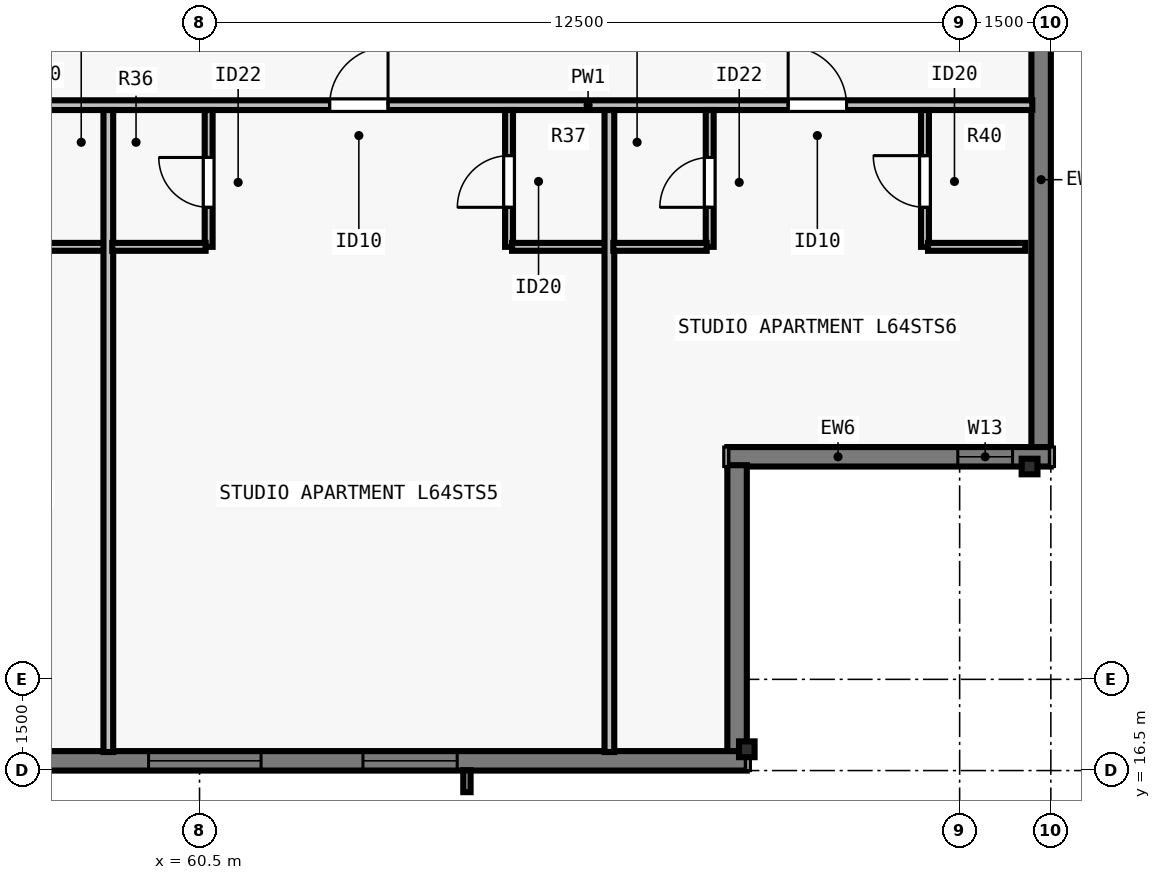
"""IFC4 building model, lengths in metres.
Left out: names, types, materials, properties, quantities, classifications, styles, units other than length and angle.
Written with IfcOpenShell. Run it as: python <this file> out.ifc"""

import sys

from ifc_helpers import new_model, si_unit, direction, frame, frame_2d, origin, origin_2d, place, context, subcontext, project, spatial, rectangle, i_section, extrude, element, fill, save


model = new_model("IFC4")
c1 = context("Model", 3, precision=1e-05, world=origin(), true_north=direction((0.0, 1.0)))
c2 = subcontext(c1, "Body", "Model", "MODEL_VIEW")
j1 = project(units=[si_unit("LENGTHUNIT", "METRE"), si_unit("PLANEANGLEUNIT", "RADIAN")], contexts=[c1])
p1 = place(None, origin())
s1 = spatial("IfcSite", under=j1, at=p1, CompositionType="ELEMENT")
p2 = place(p1, origin())
s2 = spatial("IfcBuilding", under=s1, at=p2, CompositionType="ELEMENT")
p3 = place(p2, frame((0.0, 0.0, 234.0)))
s3 = spatial("IfcBuildingStorey", under=s2, at=p3, CompositionType="ELEMENT", Elevation=234.0)
for number, where, z_axis, x_axis in (
    (1, (69.5, 16.85, 0.0), (0.0, 0.0, 1.0), (1.0, 0.0, 0.0)),
    (2, (74.15, 21.5, 0.0), (0.0, 0.0, 1.0), (0.0, 1.0, 0.0)),
):
    element("IfcColumn", number, at=place(p3, frame(where, z_axis=z_axis, x_axis=x_axis)), inside=s3, PredefinedType="COLUMN", context=c2, shape_type="SweptSolid", body=[
        extrude(i_section(OverallWidth=0.256, OverallDepth=0.26, WebThickness=0.01, FlangeThickness=0.017, FilletRadius=0.013, at=origin_2d()), origin(), (0.0, 0.0, 1.0), 3.5),
    ])
p4 = place(p3, frame((74.34, 56.5, 0.0), z_axis=(0.0, 0.0, 1.0), x_axis=(0.0, -1.0, 0.0)))
e3 = element("IfcWall", 3, at=p4, inside=s3, PredefinedType="SOLIDWALL", context=c2, shape_type="SweptSolid", body=[
    extrude(rectangle(XDim=34.702, YDim=0.32, at=frame_2d((17.351, 0.0))), origin(), (0.0, 0.0, 1.0), 3.29),
])
p5 = place(p4, frame((3.913, 0.0, 0.8)))
e4 = element("IfcOpeningElement", 4, at=p5, cuts=e3, PredefinedType="OPENING", context=c2, shape_type="SweptSolid", body=[
    extrude(rectangle(XDim=1.55, YDim=1.678, at=frame_2d((0.775, 0.839))), frame((0.0, 0.17, 0.0), z_axis=(0.0, -1.0, 0.0), x_axis=(1.0, 0.0, 0.0)), (0.0, 0.0, 1.0), 0.34),
])
p6 = place(p4, frame((6.738, 0.0, 0.8)))
e5 = element("IfcOpeningElement", 5, at=p6, cuts=e3, PredefinedType="OPENING", context=c2, shape_type="SweptSolid", body=[
    extrude(rectangle(XDim=1.85, YDim=1.678, at=frame_2d((0.925, 0.839))), frame((0.0, 0.17, 0.0), z_axis=(0.0, -1.0, 0.0), x_axis=(1.0, 0.0, 0.0)), (0.0, 0.0, 1.0), 0.34),
])
p7 = place(p4, frame((10.263, 0.0, 0.8)))
e6 = element("IfcOpeningElement", 6, at=p7, cuts=e3, PredefinedType="OPENING", context=c2, shape_type="SweptSolid", body=[
    extrude(rectangle(XDim=1.55, YDim=1.678, at=frame_2d((0.775, 0.839))), frame((0.0, 0.17, 0.0), z_axis=(0.0, -1.0, 0.0), x_axis=(1.0, 0.0, 0.0)), (0.0, 0.0, 1.0), 0.34),
])
p8 = place(p4, frame((14.738, 0.0, 0.8)))
e7 = element("IfcOpeningElement", 7, at=p8, cuts=e3, PredefinedType="OPENING", context=c2, shape_type="SweptSolid", body=[
    extrude(rectangle(XDim=1.85, YDim=1.678, at=frame_2d((0.925, 0.839))), frame((0.0, 0.17, 0.0), z_axis=(0.0, -1.0, 0.0), x_axis=(1.0, 0.0, 0.0)), (0.0, 0.0, 1.0), 0.34),
])
p9 = place(p4, frame((18.264, 0.0, 0.8)))
e8 = element("IfcOpeningElement", 8, at=p9, cuts=e3, PredefinedType="OPENING", context=c2, shape_type="SweptSolid", body=[
    extrude(rectangle(XDim=1.55, YDim=1.678, at=frame_2d((0.775, 0.839))), frame((0.0, 0.17, 0.0), z_axis=(0.0, -1.0, 0.0), x_axis=(1.0, 0.0, 0.0)), (0.0, 0.0, 1.0), 0.34),
])
p10 = place(p4, frame((24.164, 0.0, 0.8)))
e9 = element("IfcOpeningElement", 9, at=p10, cuts=e3, PredefinedType="OPENING", context=c2, shape_type="SweptSolid", body=[
    extrude(rectangle(XDim=1.55, YDim=1.678, at=frame_2d((0.775, 0.839))), frame((0.0, 0.17, 0.0), z_axis=(0.0, -1.0, 0.0), x_axis=(1.0, 0.0, 0.0)), (0.0, 0.0, 1.0), 0.34),
])
p11 = place(p3, frame((74.5, 21.66, 0.0), z_axis=(0.0, 0.0, 1.0), x_axis=(-1.0, 0.0, 0.0)))
e10 = element("IfcWall", 10, at=p11, inside=s3, PredefinedType="SOLIDWALL", context=c2, shape_type="SweptSolid", body=[
    extrude(rectangle(XDim=5.32, YDim=0.32, at=frame_2d((2.66, 0.0))), origin(), (0.0, 0.0, 1.0), 3.29),
])
p12 = place(p11, frame((0.63, 0.0, 0.8)))
e11 = element("IfcOpeningElement", 11, at=p12, cuts=e10, PredefinedType="OPENING", context=c2, shape_type="SweptSolid", body=[
    extrude(rectangle(XDim=0.9, YDim=1.678, at=frame_2d((0.45, 0.839))), frame((0.0, 0.17, 0.0), z_axis=(0.0, -1.0, 0.0), x_axis=(1.0, 0.0, 0.0)), (0.0, 0.0, 1.0), 0.34),
])
p13 = place(p3, frame((69.34, 21.522, 0.0), z_axis=(0.0, 0.0, 1.0), x_axis=(0.0, -1.0, 0.0)))
e12 = element("IfcWall", 12, at=p13, inside=s3, PredefinedType="SOLIDWALL", context=c2, shape_type="SweptSolid", body=[
    extrude(rectangle(XDim=4.724, YDim=0.32, at=frame_2d((2.362, 0.0))), origin(), (0.0, 0.0, 1.0), 3.29),
])
p14 = place(p3, frame((69.5, 16.66, 0.0), z_axis=(0.0, 0.0, 1.0), x_axis=(-1.0, 0.0, 0.0)))
e13 = element("IfcWall", 13, at=p14, inside=s3, PredefinedType="SOLIDWALL", context=c2, shape_type="SweptSolid", body=[
    extrude(rectangle(XDim=34.702, YDim=0.32, at=frame_2d((17.351, 0.0))), origin(), (0.0, 0.0, 1.0), 3.29),
])
p15 = place(p14, frame((4.763, 0.0, 0.8)))
e14 = element("IfcOpeningElement", 14, at=p15, cuts=e13, PredefinedType="OPENING", context=c2, shape_type="SweptSolid", body=[
    extrude(rectangle(XDim=1.55, YDim=1.678, at=frame_2d((0.775, 0.839))), frame((0.0, 0.17, 0.0), z_axis=(0.0, -1.0, 0.0), x_axis=(1.0, 0.0, 0.0)), (0.0, 0.0, 1.0), 0.34),
])
p16 = place(p14, frame((7.988, 0.0, 0.8)))
e15 = element("IfcOpeningElement", 15, at=p16, cuts=e13, PredefinedType="OPENING", context=c2, shape_type="SweptSolid", body=[
    extrude(rectangle(XDim=1.85, YDim=1.678, at=frame_2d((0.925, 0.839))), frame((0.0, 0.17, 0.0), z_axis=(0.0, -1.0, 0.0), x_axis=(1.0, 0.0, 0.0)), (0.0, 0.0, 1.0), 0.34),
])
p17 = place(p14, frame((14.738, 0.0, 0.8)))
e16 = element("IfcOpeningElement", 16, at=p17, cuts=e13, PredefinedType="OPENING", context=c2, shape_type="SweptSolid", body=[
    extrude(rectangle(XDim=1.85, YDim=1.678, at=frame_2d((0.925, 0.839))), frame((0.0, 0.17, 0.0), z_axis=(0.0, -1.0, 0.0), x_axis=(1.0, 0.0, 0.0)), (0.0, 0.0, 1.0), 0.34),
])
p18 = place(p14, frame((18.264, 0.0, 0.8)))
e17 = element("IfcOpeningElement", 17, at=p18, cuts=e13, PredefinedType="OPENING", context=c2, shape_type="SweptSolid", body=[
    extrude(rectangle(XDim=1.55, YDim=1.678, at=frame_2d((0.775, 0.839))), frame((0.0, 0.17, 0.0), z_axis=(0.0, -1.0, 0.0), x_axis=(1.0, 0.0, 0.0)), (0.0, 0.0, 1.0), 0.34),
])
p19 = place(p14, frame((25.864, 0.0, 0.8)))
e18 = element("IfcOpeningElement", 18, at=p19, cuts=e13, PredefinedType="OPENING", context=c2, shape_type="SweptSolid", body=[
    extrude(rectangle(XDim=1.55, YDim=1.678, at=frame_2d((0.775, 0.839))), frame((0.0, 0.17, 0.0), z_axis=(0.0, -1.0, 0.0), x_axis=(1.0, 0.0, 0.0)), (0.0, 0.0, 1.0), 0.34),
])
p20 = place(p14, frame((28.24, 0.0, 0.8)))
e19 = element("IfcOpeningElement", 19, at=p20, cuts=e13, PredefinedType="OPENING", context=c2, shape_type="SweptSolid", body=[
    extrude(rectangle(XDim=1.85, YDim=1.678, at=frame_2d((0.925, 0.839))), frame((0.0, 0.17, 0.0), z_axis=(0.0, -1.0, 0.0), x_axis=(1.0, 0.0, 0.0)), (0.0, 0.0, 1.0), 0.34),
])
p21 = place(p3, frame((29.805, 27.442, 0.0), z_axis=(0.0, 0.0, 1.0), x_axis=(1.0, 0.0, 0.0)))
e20 = element("IfcWall", 20, at=p21, inside=s3, PredefinedType="PARTITIONING", context=c2, shape_type="SweptSolid", body=[
    extrude(rectangle(XDim=44.39, YDim=0.16, at=frame_2d((22.195, 0.0))), origin(), (0.0, 0.0, 1.0), 2.958),
])
p22 = place(p21, frame((3.575, 0.0, 0.0)))
e21 = element("IfcOpeningElement", 21, at=p22, cuts=e20, PredefinedType="OPENING", context=c2, shape_type="SweptSolid", body=[
    extrude(rectangle(XDim=0.96, YDim=2.18, at=frame_2d((0.48, 1.09))), frame((0.0, 0.09, 0.0), z_axis=(0.0, -1.0, 0.0), x_axis=(1.0, 0.0, 0.0)), (0.0, 0.0, 1.0), 0.18),
])
p23 = place(p21, frame((10.755, 0.0, 0.0)))
e22 = element("IfcOpeningElement", 22, at=p23, cuts=e20, PredefinedType="OPENING", context=c2, shape_type="SweptSolid", body=[
    extrude(rectangle(XDim=0.96, YDim=2.18, at=frame_2d((0.48, 1.09))), frame((0.0, 0.09, 0.0), z_axis=(0.0, -1.0, 0.0), x_axis=(1.0, 0.0, 0.0)), (0.0, 0.0, 1.0), 0.18),
])
p24 = place(p21, frame((18.115, 0.0, 0.0)))
e23 = element("IfcOpeningElement", 23, at=p24, cuts=e20, PredefinedType="OPENING", context=c2, shape_type="SweptSolid", body=[
    extrude(rectangle(XDim=0.96, YDim=2.18, at=frame_2d((0.48, 1.09))), frame((0.0, 0.09, 0.0), z_axis=(0.0, -1.0, 0.0), x_axis=(1.0, 0.0, 0.0)), (0.0, 0.0, 1.0), 0.18),
])
p25 = place(p21, frame((25.475, 0.0, 0.0)))
e24 = element("IfcOpeningElement", 24, at=p25, cuts=e20, PredefinedType="OPENING", context=c2, shape_type="SweptSolid", body=[
    extrude(rectangle(XDim=0.96, YDim=2.18, at=frame_2d((0.48, 1.09))), frame((0.0, 0.09, 0.0), z_axis=(0.0, -1.0, 0.0), x_axis=(1.0, 0.0, 0.0)), (0.0, 0.0, 1.0), 0.18),
])
p26 = place(p21, frame((32.835, 0.0, 0.0)))
e25 = element("IfcOpeningElement", 25, at=p26, cuts=e20, PredefinedType="OPENING", context=c2, shape_type="SweptSolid", body=[
    extrude(rectangle(XDim=0.96, YDim=2.18, at=frame_2d((0.48, 1.09))), frame((0.0, 0.09, 0.0), z_axis=(0.0, -1.0, 0.0), x_axis=(1.0, 0.0, 0.0)), (0.0, 0.0, 1.0), 0.18),
])
p27 = place(p21, frame((40.375, 0.0, 0.0)))
e26 = element("IfcOpeningElement", 26, at=p27, cuts=e20, PredefinedType="OPENING", context=c2, shape_type="SweptSolid", body=[
    extrude(rectangle(XDim=0.96, YDim=2.18, at=frame_2d((0.48, 1.09))), frame((0.0, 0.09, 0.0), z_axis=(0.0, -1.0, 0.0), x_axis=(1.0, 0.0, 0.0)), (0.0, 0.0, 1.0), 0.18),
])
p28 = place(p3, frame((57.4, 25.113, 0.0), z_axis=(0.0, 0.0, 1.0), x_axis=(1.0, 0.0, 0.0)))
e27 = element("IfcWall", 27, at=p28, inside=s3, PredefinedType="PLUMBINGWALL", context=c2, shape_type="SweptSolid", body=[
    extrude(rectangle(XDim=1.6, YDim=0.13, at=frame_2d((0.8, 0.0))), origin(), (0.0, 0.0, 1.0), 3.29),
])
p29 = place(p3, frame((59.0, 16.805, 0.0), z_axis=(0.0, 0.0, 1.0), x_axis=(0.0, 1.0, 0.0)))
e28 = element("IfcWall", 28, at=p29, inside=s3, PredefinedType="PARTITIONING", context=c2, shape_type="SweptSolid", body=[
    extrude(rectangle(XDim=10.558, YDim=0.16, at=frame_2d((5.279, 0.0))), origin(), (0.0, 0.0, 1.0), 3.29),
])
p30 = place(p3, frame((60.65, 25.113, 0.0), z_axis=(0.0, 0.0, 1.0), x_axis=(0.0, 1.0, 0.0)))
e29 = element("IfcWall", 29, at=p30, inside=s3, PredefinedType="PLUMBINGWALL", context=c2, shape_type="SweptSolid", body=[
    extrude(rectangle(XDim=2.25, YDim=0.13, at=frame_2d((1.125, 0.0))), origin(), (0.0, 0.0, 1.0), 3.29),
])
p31 = place(p30, frame((0.65, 0.0, 0.0)))
e30 = element("IfcOpeningElement", 30, at=p31, cuts=e29, PredefinedType="OPENING", context=c2, shape_type="SweptSolid", body=[
    extrude(rectangle(XDim=0.82, YDim=2.1, at=frame_2d((0.41, 1.05))), frame((0.0, 0.075, 0.0), z_axis=(0.0, -1.0, 0.0), x_axis=(1.0, 0.0, 0.0)), (0.0, 0.0, 1.0), 0.15),
])
p32 = place(p3, frame((59.065, 25.113, 0.0), z_axis=(0.0, 0.0, 1.0), x_axis=(1.0, 0.0, 0.0)))
e31 = element("IfcWall", 31, at=p32, inside=s3, PredefinedType="PLUMBINGWALL", context=c2, shape_type="SweptSolid", body=[
    extrude(rectangle(XDim=1.535, YDim=0.13, at=frame_2d((0.768, 0.0))), origin(), (0.0, 0.0, 1.0), 3.29),
])
p33 = place(p3, frame((65.59, 25.113, 0.0), z_axis=(0.0, 0.0, 1.0), x_axis=(0.0, 1.0, 0.0)))
e32 = element("IfcWall", 32, at=p33, inside=s3, PredefinedType="PLUMBINGWALL", context=c2, shape_type="SweptSolid", body=[
    extrude(rectangle(XDim=2.25, YDim=0.13, at=frame_2d((1.125, 0.0))), origin(), (0.0, 0.0, 1.0), 3.29),
])
p34 = place(p33, frame((0.65, 0.0, 0.0)))
e33 = element("IfcOpeningElement", 33, at=p34, cuts=e32, PredefinedType="OPENING", context=c2, shape_type="SweptSolid", body=[
    extrude(rectangle(XDim=0.85, YDim=2.1, at=frame_2d((0.425, 1.05))), frame((0.0, 0.075, 0.0), z_axis=(0.0, -1.0, 0.0), x_axis=(1.0, 0.0, 0.0)), (0.0, 0.0, 1.0), 0.15),
])
p35 = place(p3, frame((65.64, 25.113, 0.0), z_axis=(0.0, 0.0, 1.0), x_axis=(1.0, 0.0, 0.0)))
e34 = element("IfcWall", 34, at=p35, inside=s3, PredefinedType="PLUMBINGWALL", context=c2, shape_type="SweptSolid", body=[
    extrude(rectangle(XDim=1.6, YDim=0.13, at=frame_2d((0.8, 0.0))), origin(), (0.0, 0.0, 1.0), 3.29),
])
p36 = place(p3, frame((67.24, 16.805, 0.0), z_axis=(0.0, 0.0, 1.0), x_axis=(0.0, 1.0, 0.0)))
e35 = element("IfcWall", 35, at=p36, inside=s3, PredefinedType="PARTITIONING", context=c2, shape_type="SweptSolid", body=[
    extrude(rectangle(XDim=10.558, YDim=0.16, at=frame_2d((5.279, 0.0))), origin(), (0.0, 0.0, 1.0), 2.573),
])
p37 = place(p3, frame((68.89, 25.113, 0.0), z_axis=(0.0, 0.0, 1.0), x_axis=(0.0, 1.0, 0.0)))
e36 = element("IfcWall", 36, at=p37, inside=s3, PredefinedType="PLUMBINGWALL", context=c2, shape_type="SweptSolid", body=[
    extrude(rectangle(XDim=2.25, YDim=0.13, at=frame_2d((1.125, 0.0))), origin(), (0.0, 0.0, 1.0), 3.29),
])
p38 = place(p37, frame((0.65, 0.0, 0.0)))
e37 = element("IfcOpeningElement", 37, at=p38, cuts=e36, PredefinedType="OPENING", context=c2, shape_type="SweptSolid", body=[
    extrude(rectangle(XDim=0.82, YDim=2.1, at=frame_2d((0.41, 1.05))), frame((0.0, 0.075, 0.0), z_axis=(0.0, -1.0, 0.0), x_axis=(1.0, 0.0, 0.0)), (0.0, 0.0, 1.0), 0.15),
])
p39 = place(p3, frame((67.305, 25.113, 0.0), z_axis=(0.0, 0.0, 1.0), x_axis=(1.0, 0.0, 0.0)))
e38 = element("IfcWall", 38, at=p39, inside=s3, PredefinedType="PLUMBINGWALL", context=c2, shape_type="SweptSolid", body=[
    extrude(rectangle(XDim=1.535, YDim=0.13, at=frame_2d((0.768, 0.0))), origin(), (0.0, 0.0, 1.0), 2.958),
])
p40 = place(p3, frame((72.43, 25.113, 0.0), z_axis=(0.0, 0.0, 1.0), x_axis=(0.0, 1.0, 0.0)))
e39 = element("IfcWall", 39, at=p40, inside=s3, PredefinedType="PLUMBINGWALL", context=c2, shape_type="SweptSolid", body=[
    extrude(rectangle(XDim=2.25, YDim=0.13, at=frame_2d((1.125, 0.0))), origin(), (0.0, 0.0, 1.0), 3.29),
])
p41 = place(p40, frame((0.65, 0.0, 0.0)))
e40 = element("IfcOpeningElement", 40, at=p41, cuts=e39, PredefinedType="OPENING", context=c2, shape_type="SweptSolid", body=[
    extrude(rectangle(XDim=0.85, YDim=2.1, at=frame_2d((0.425, 1.05))), frame((0.0, 0.075, 0.0), z_axis=(0.0, -1.0, 0.0), x_axis=(1.0, 0.0, 0.0)), (0.0, 0.0, 1.0), 0.15),
])
p42 = place(p3, frame((72.48, 25.113, 0.0), z_axis=(0.0, 0.0, 1.0), x_axis=(1.0, 0.0, 0.0)))
e41 = element("IfcWall", 41, at=p42, inside=s3, PredefinedType="PLUMBINGWALL", context=c2, shape_type="SweptSolid", body=[
    extrude(rectangle(XDim=1.6, YDim=0.13, at=frame_2d((0.8, 0.0))), origin(), (0.0, 0.0, 1.0), 3.29),
])
p43 = place(p15, origin())
e42 = element("IfcWindow", 42, at=p43, inside=s3, PartitioningType="SINGLE_PANEL", PredefinedType="WINDOW", context=c2, shape_type="SweptSolid", body=[
    extrude(rectangle(XDim=1.55, YDim=1.678, at=frame_2d((0.775, 0.839))), frame((0.0, -0.05, 0.0), z_axis=(0.0, -1.0, 0.0), x_axis=(1.0, 0.0, 0.0)), (0.0, 0.0, 1.0), 0.06),
])
fill(e14, e42)
p44 = place(p16, origin())
e43 = element("IfcWindow", 43, at=p44, inside=s3, PartitioningType="SINGLE_PANEL", PredefinedType="WINDOW", context=c2, shape_type="SweptSolid", body=[
    extrude(rectangle(XDim=1.85, YDim=1.678, at=frame_2d((0.925, 0.839))), frame((0.0, -0.05, 0.0), z_axis=(0.0, -1.0, 0.0), x_axis=(1.0, 0.0, 0.0)), (0.0, 0.0, 1.0), 0.06),
])
fill(e15, e43)
p45 = place(p12, origin())
e44 = element("IfcWindow", 44, at=p45, inside=s3, PartitioningType="SINGLE_PANEL", PredefinedType="WINDOW", context=c2, shape_type="SweptSolid", body=[
    extrude(rectangle(XDim=0.9, YDim=1.678, at=frame_2d((0.45, 0.839))), frame((0.0, -0.04, 0.0), z_axis=(0.0, -1.0, 0.0), x_axis=(1.0, 0.0, 0.0)), (0.0, 0.0, 1.0), 0.06),
])
fill(e11, e44)
p46 = place(p31, origin())
e45 = element("IfcDoor", 45, at=p46, inside=s3, OperationType="SINGLE_SWING_RIGHT", PredefinedType="DOOR", context=c2, shape_type="SweptSolid", body=[
    extrude(rectangle(XDim=0.82, YDim=2.1, at=frame_2d((0.41, 1.05))), frame((0.0, 0.025, 0.0), z_axis=(0.0, -1.0, 0.0), x_axis=(1.0, 0.0, 0.0)), (0.0, 0.0, 1.0), 0.05),
])
fill(e30, e45)
p47 = place(p34, origin())
e46 = element("IfcDoor", 46, at=p47, inside=s3, OperationType="SINGLE_SWING_LEFT", PredefinedType="DOOR", context=c2, shape_type="SweptSolid", body=[
    extrude(rectangle(XDim=0.85, YDim=2.1, at=frame_2d((0.425, 1.05))), frame((0.0, 0.025, 0.0), z_axis=(0.0, -1.0, 0.0), x_axis=(1.0, 0.0, 0.0)), (0.0, 0.0, 1.0), 0.05),
])
fill(e33, e46)
p48 = place(p26, origin())
e47 = element("IfcDoor", 47, at=p48, inside=s3, OperationType="SINGLE_SWING_RIGHT", PredefinedType="DOOR", context=c2, shape_type="SweptSolid", body=[
    extrude(rectangle(XDim=0.96, YDim=2.18, at=frame_2d((0.48, 1.09))), frame((0.0, 0.025, 0.0), z_axis=(0.0, -1.0, 0.0), x_axis=(1.0, 0.0, 0.0)), (0.0, 0.0, 1.0), 0.05),
])
fill(e25, e47)
p49 = place(p38, origin())
e48 = element("IfcDoor", 48, at=p49, inside=s3, OperationType="SINGLE_SWING_LEFT", PredefinedType="DOOR", context=c2, shape_type="SweptSolid", body=[
    extrude(rectangle(XDim=0.82, YDim=2.1, at=frame_2d((0.41, 1.05))), frame((0.0, 0.025, 0.0), z_axis=(0.0, -1.0, 0.0), x_axis=(1.0, 0.0, 0.0)), (0.0, 0.0, 1.0), 0.05),
])
fill(e37, e48)
p50 = place(p41, origin())
e49 = element("IfcDoor", 49, at=p50, inside=s3, OperationType="SINGLE_SWING_RIGHT", PredefinedType="DOOR", context=c2, shape_type="SweptSolid", body=[
    extrude(rectangle(XDim=0.85, YDim=2.1, at=frame_2d((0.425, 1.05))), frame((0.0, 0.025, 0.0), z_axis=(0.0, -1.0, 0.0), x_axis=(1.0, 0.0, 0.0)), (0.0, 0.0, 1.0), 0.05),
])
fill(e40, e49)
p51 = place(p27, origin())
e50 = element("IfcDoor", 50, at=p51, inside=s3, OperationType="SINGLE_SWING_LEFT", PredefinedType="DOOR", context=c2, shape_type="SweptSolid", body=[
    extrude(rectangle(XDim=0.96, YDim=2.18, at=frame_2d((0.48, 1.09))), frame((0.0, 0.025, 0.0), z_axis=(0.0, -1.0, 0.0), x_axis=(1.0, 0.0, 0.0)), (0.0, 0.0, 1.0), 0.05),
])
fill(e26, e50)
save(model, sys.argv[1])
